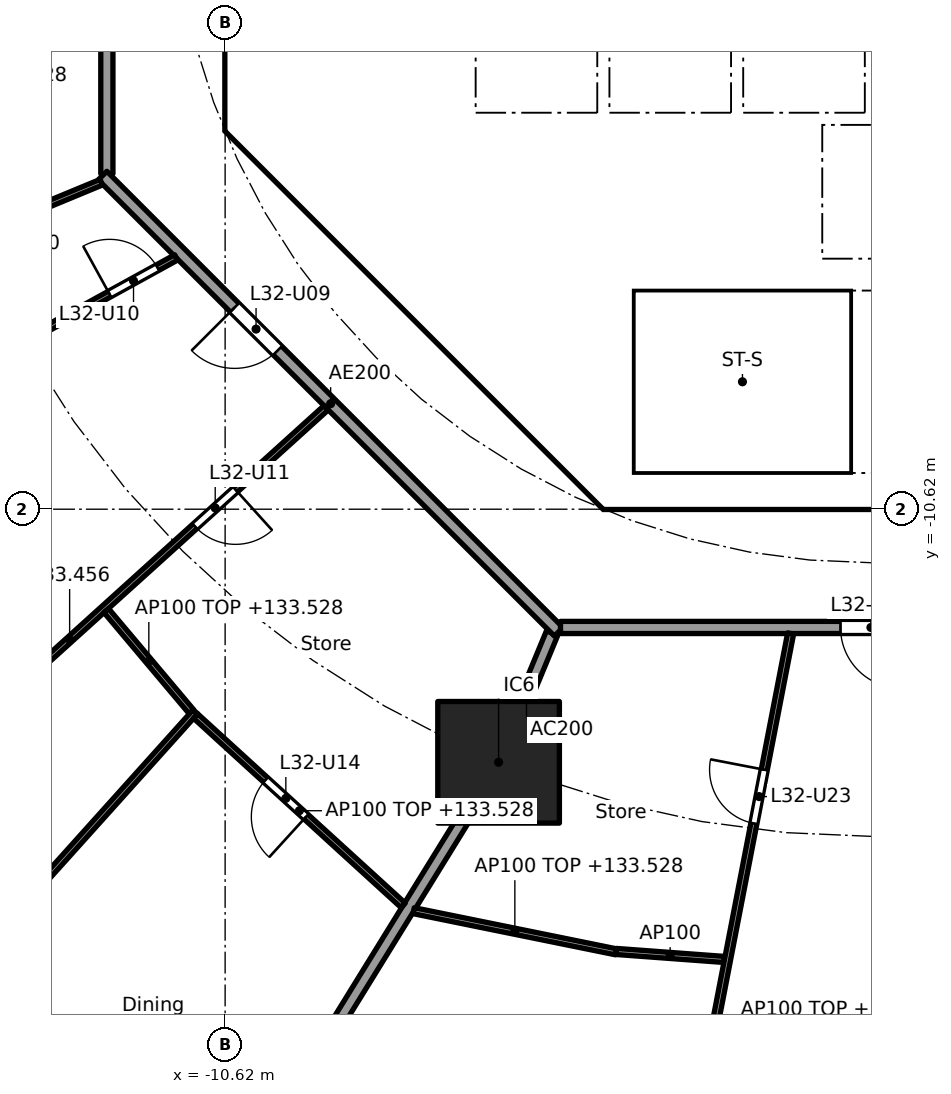
"""IFC4 building model, lengths in metres.
Left out: names, types, materials, properties, quantities, classifications, styles, units other than length and angle.
Written with IfcOpenShell. Run it as: python <this file> out.ifc"""

import sys

from ifc_helpers import new_model, si_unit, direction, frame, frame_2d, origin, origin_2d, place, context, subcontext, project, spatial, polyline, rectangle, outline, extrude, element, fill, save


model = new_model("IFC4")
c1 = context("Model", 3, precision=1e-05, world=origin(), true_north=direction((0.0, 1.0)))
c2 = subcontext(c1, "Body", "Model", "MODEL_VIEW")
j1 = project(units=[si_unit("LENGTHUNIT", "METRE"), si_unit("PLANEANGLEUNIT", "RADIAN")], contexts=[c1])
p1 = place(None, origin())
s1 = spatial("IfcSite", under=j1, at=p1, CompositionType="ELEMENT")
p2 = place(p1, origin())
s2 = spatial("IfcBuilding", under=s1, at=p2, CompositionType="ELEMENT")
p3 = place(p2, frame((0.0, 0.0, 130.7)))
s3 = spatial("IfcBuildingStorey", under=s2, at=p3, CompositionType="ELEMENT", Elevation=130.7)
p4 = place(p3, frame((-6.123, -14.782, 0.0), z_axis=(0.0, 0.0, 1.0), x_axis=(1.0, 0.0, 0.0)))
e1 = element("IfcColumn", 1, at=p4, inside=s3, PredefinedType="COLUMN", context=c2, shape_type="SweptSolid", body=[
    extrude(rectangle(XDim=2.0, YDim=2.0, at=origin_2d()), origin(), (0.0, 0.0, 1.0), 3.7),
])
p5 = place(p3, frame((-10.325, 3.801, 0.0), z_axis=(0.0, 0.0, 1.0), x_axis=(0.0, -1.0, 0.0)))
e2 = element("IfcWall", 2, at=p5, inside=s3, PredefinedType="SHEAR", context=c2, shape_type="SweptSolid", body=[
    extrude(rectangle(XDim=7.602, YDim=0.6, at=frame_2d((3.801, 0.0))), origin(), (0.0, 0.0, 1.0), 3.44),
])
p6 = place(p5, frame((0.651, 0.0, 0.0)))
e3 = element("IfcOpeningElement", 3, at=p6, cuts=e2, PredefinedType="OPENING", context=c2, shape_type="SweptSolid", body=[
    extrude(rectangle(XDim=1.5, YDim=2.1, at=frame_2d((0.75, 1.05))), frame((0.0, 0.31, 0.0), z_axis=(0.0, -1.0, 0.0), x_axis=(1.0, 0.0, 0.0)), (0.0, 0.0, 1.0), 0.62),
])
p7 = place(p5, frame((5.451, 0.0, 0.0)))
e4 = element("IfcOpeningElement", 4, at=p7, cuts=e2, PredefinedType="OPENING", context=c2, shape_type="SweptSolid", body=[
    extrude(rectangle(XDim=1.5, YDim=2.1, at=frame_2d((0.75, 1.05))), frame((0.0, 0.31, 0.0), z_axis=(0.0, -1.0, 0.0), x_axis=(1.0, 0.0, 0.0)), (0.0, 0.0, 1.0), 0.62),
])
p8 = place(p3, frame((-9.988, -4.613, 0.0), z_axis=(0.0, 0.0, 1.0), x_axis=(0.707106781187, -0.707106781187, 0.0)))
e5 = element("IfcWall", 5, at=p8, inside=s3, PredefinedType="SHEAR", context=c2, shape_type="SweptSolid", body=[
    extrude(rectangle(XDim=7.602, YDim=0.6, at=frame_2d((3.801, 0.0))), origin(), (0.0, 0.0, 1.0), 3.44),
])
p9 = place(p8, frame((6.151, 0.0, 0.0)))
e6 = element("IfcOpeningElement", 6, at=p9, cuts=e5, PredefinedType="OPENING", context=c2, shape_type="SweptSolid", body=[
    extrude(rectangle(XDim=1.1, YDim=2.1, at=frame_2d((0.55, 1.05))), frame((0.0, 0.31, 0.0), z_axis=(0.0, -1.0, 0.0), x_axis=(1.0, 0.0, 0.0)), (0.0, 0.0, 1.0), 0.62),
])
p10 = place(p3, frame((-6.2, -7.827, 0.0), z_axis=(0.0, 0.0, 1.0), x_axis=(0.0, 1.0, 0.0)))
e7 = element("IfcWall", 7, at=p10, inside=s3, PredefinedType="PARTITIONING", context=c2, shape_type="SweptSolid", body=[
    extrude(rectangle(XDim=3.527, YDim=0.15, at=frame_2d((1.763, 0.0))), origin(), (0.0, 0.0, 1.0), 3.44),
])
p11 = place(p10, frame((2.365, 0.0, 0.0)))
e8 = element("IfcOpeningElement", 8, at=p11, cuts=e7, PredefinedType="OPENING", context=c2, shape_type="SweptSolid", body=[
    extrude(rectangle(XDim=0.9, YDim=2.1, at=frame_2d((0.45, 1.05))), frame((0.0, 0.085, 0.0), z_axis=(0.0, -1.0, 0.0), x_axis=(1.0, 0.0, 0.0)), (0.0, 0.0, 1.0), 0.17),
])
p12 = place(p10, frame((0.489, 0.0, 0.0)))
e9 = element("IfcOpeningElement", 9, at=p12, cuts=e7, PredefinedType="OPENING", context=c2, shape_type="SweptSolid", body=[
    extrude(rectangle(XDim=0.9, YDim=2.1, at=frame_2d((0.45, 1.05))), frame((0.0, 0.085, 0.0), z_axis=(0.0, -1.0, 0.0), x_axis=(1.0, 0.0, 0.0)), (0.0, 0.0, 1.0), 0.17),
])
p13 = place(p3, frame((-4.0, -6.5, 0.0), z_axis=(0.0, 0.0, 1.0), x_axis=(0.0, 1.0, 0.0)))
e10 = element("IfcWall", 10, at=p13, inside=s3, PredefinedType="SOLIDWALL", context=c2, shape_type="SweptSolid", body=[
    extrude(rectangle(XDim=2.2, YDim=0.2, at=frame_2d((1.1, 0.0))), origin(), (0.0, 0.0, 1.0), 3.44),
])
p14 = place(p13, frame((0.65, 0.0, 0.0)))
e11 = element("IfcOpeningElement", 11, at=p14, cuts=e10, PredefinedType="OPENING", context=c2, shape_type="SweptSolid", body=[
    extrude(rectangle(XDim=0.9, YDim=2.1, at=frame_2d((0.45, 1.05))), frame((0.0, 0.11, 0.0), z_axis=(0.0, -1.0, 0.0), x_axis=(1.0, 0.0, 0.0)), (0.0, 0.0, 1.0), 0.22),
])
p15 = place(p3, origin())
e12 = element("IfcWall", 12, at=p15, inside=s3, PredefinedType="SHEAR", context=c2, shape_type="SweptSolid", body=[
    extrude(outline(polyline([(-10.625, -3.801), (-10.025, -3.801), (-10.025, -4.152), (-9.776, -4.401), (-10.2, -4.825), (-10.625, -4.401), (-10.625, -3.801)])), origin(), (0.0, 0.0, 1.0), 3.44),
])
p16 = place(p3, origin())
e13 = element("IfcWall", 13, at=p16, inside=s3, PredefinedType="SHEAR", context=c2, shape_type="SweptSolid", body=[
    extrude(outline(polyline([(-4.152, -10.025), (4.152, -10.025), (4.401, -9.776), (4.825, -10.2), (4.401, -10.625), (-4.401, -10.625), (-4.825, -10.2), (-4.401, -9.776), (-4.152, -10.025)])), origin(), (0.0, 0.0, 1.0), 3.44),
])
p17 = place(p3, frame((-10.025, -4.0, 0.0), z_axis=(0.0, 0.0, 1.0), x_axis=(1.0, 0.0, 0.0)))
e14 = element("IfcWall", 14, at=p17, inside=s3, PredefinedType="PARTITIONING", context=c2, shape_type="SweptSolid", body=[
    extrude(rectangle(XDim=3.325, YDim=0.2, at=frame_2d((1.662, 0.0))), origin(), (0.0, 0.0, 1.0), 3.44),
])
p18 = place(p3, frame((-8.301, -5.8, 0.0), z_axis=(0.0, 0.0, 1.0), x_axis=(1.0, 0.0, 0.0)))
e15 = element("IfcWall", 15, at=p18, inside=s3, PredefinedType="PARTITIONING", context=c2, shape_type="SweptSolid", body=[
    extrude(rectangle(XDim=2.026, YDim=0.15, at=frame_2d((1.013, 0.0))), origin(), (0.0, 0.0, 1.0), 3.44),
])
p19 = place(p3, frame((-0.9, -6.5, 0.0), z_axis=(0.0, 0.0, 1.0), x_axis=(0.0, 1.0, 0.0)))
e16 = element("IfcWall", 16, at=p19, inside=s3, PredefinedType="SOLIDWALL", context=c2, shape_type="SweptSolid", body=[
    extrude(rectangle(XDim=2.2, YDim=0.2, at=frame_2d((1.1, 0.0))), origin(), (0.0, 0.0, 1.0), 3.44),
])
p20 = place(p3, origin())
e17 = element("IfcWall", 17, at=p20, inside=s3, PredefinedType="SOLIDWALL", context=c2, shape_type="SweptSolid", body=[
    extrude(outline(polyline([(-6.7, -2.1), (-6.5, -2.1), (-6.5, -4.1), (-4.5, -4.1), (-4.5, -2.1), (-4.3, -2.1), (-4.3, -4.1), (-2.3, -4.1), (-2.3, -2.1), (-2.1, -2.1), (-2.1, -4.1), (-0.1, -4.1), (-0.1, -2.1), (0.1, -2.1), (0.1, -4.1), (2.1, -4.1), (2.1, -2.1), (2.3, -2.1), (2.3, -4.1), (4.3, -4.1), (4.3, -2.1), (4.5, -2.1), (4.5, -4.1), (6.5, -4.1), (6.5, -2.1), (6.7, -2.1), (6.7, -4.3), (-6.7, -4.3), (-6.7, -2.1)])), origin(), (0.0, 0.0, 1.0), 3.44),
])
p21 = place(p3, origin())
e18 = element("IfcWall", 18, at=p21, inside=s3, PredefinedType="SOLIDWALL", context=c2, shape_type="SweptSolid", body=[
    extrude(outline(polyline([(-3.9, -10.025), (-4.1, -10.025), (-4.1, -7.025), (-3.9, -7.025), (-3.9, -10.025)])), origin(), (0.0, 0.0, 1.0), 3.44),
])
p22 = place(p3, origin())
e19 = element("IfcWall", 19, at=p22, inside=s3, PredefinedType="SOLIDWALL", context=c2, shape_type="SweptSolid", body=[
    extrude(outline(polyline([(4.1, -7.025), (-4.1, -7.025), (-4.1, -6.5), (4.1, -6.5), (4.1, -7.025)])), origin(), (0.0, 0.0, 1.0), 3.44),
])
p23 = place(p3, frame((-5.243, -12.657, 0.0), z_axis=(0.0, 0.0, 1.0), x_axis=(-0.382818775282, -0.923823460025, 0.0)))
e20 = element("IfcWall", 20, at=p23, inside=s3, PredefinedType="PARTITIONING", context=c2, shape_type="SweptSolid", body=[
    extrude(rectangle(XDim=2.201, YDim=0.2, at=frame_2d((1.101, 0.0))), origin(), (0.0, 0.0, 1.0), 3.44),
])
p24 = place(p3, frame((-6.149, -14.825, 0.0), z_axis=(0.0, 0.0, 1.0), x_axis=(-0.525406383516, -0.85085141603, 0.0)))
e21 = element("IfcWall", 21, at=p24, inside=s3, PredefinedType="PARTITIONING", context=c2, shape_type="SweptSolid", body=[
    extrude(rectangle(XDim=15.925, YDim=0.2, at=frame_2d((7.962, 0.0))), origin(), (0.0, 0.0, 1.0), 2.828),
])
p25 = place(p3, frame((-12.565, 5.304, 0.0), z_axis=(0.0, 0.0, 1.0), x_axis=(0.0, -1.0, 0.0)))
e22 = element("IfcWall", 22, at=p25, inside=s3, PredefinedType="PARTITIONING", context=c2, shape_type="SweptSolid", body=[
    extrude(rectangle(XDim=10.409, YDim=0.2, at=frame_2d((5.205, 0.0))), origin(), (0.0, 0.0, 1.0), 3.44),
])
p26 = place(p3, frame((-12.635, -5.134, 0.0), z_axis=(0.0, 0.0, 1.0), x_axis=(0.707106781187, -0.707106781187, 0.0)))
e23 = element("IfcWall", 23, at=p26, inside=s3, PredefinedType="PARTITIONING", context=c2, shape_type="SweptSolid", body=[
    extrude(rectangle(XDim=10.609, YDim=0.2, at=frame_2d((5.305, 0.0))), origin(), (0.0, 0.0, 1.0), 3.44),
])
p27 = place(p26, frame((3.07, 0.0, 0.0)))
e24 = element("IfcOpeningElement", 24, at=p27, cuts=e23, PredefinedType="OPENING", context=c2, shape_type="SweptSolid", body=[
    extrude(rectangle(XDim=1.0, YDim=2.1, at=frame_2d((0.5, 1.05))), frame((0.0, 0.11, 0.0), z_axis=(0.0, -1.0, 0.0), x_axis=(1.0, 0.0, 0.0)), (0.0, 0.0, 1.0), 0.22),
])
p28 = place(p3, frame((-5.104, -12.565, 0.0), z_axis=(0.0, 0.0, 1.0), x_axis=(1.0, 0.0, 0.0)))
e25 = element("IfcWall", 25, at=p28, inside=s3, PredefinedType="PARTITIONING", context=c2, shape_type="SweptSolid", body=[
    extrude(rectangle(XDim=10.409, YDim=0.2, at=frame_2d((5.205, 0.0))), origin(), (0.0, 0.0, 1.0), 3.44),
])
p29 = place(p28, frame((4.604, 0.0, 0.0)))
e26 = element("IfcOpeningElement", 26, at=p29, cuts=e25, PredefinedType="OPENING", context=c2, shape_type="SweptSolid", body=[
    extrude(rectangle(XDim=1.0, YDim=2.1, at=frame_2d((0.5, 1.05))), frame((0.0, 0.11, 0.0), z_axis=(0.0, -1.0, 0.0), x_axis=(1.0, 0.0, 0.0)), (0.0, 0.0, 1.0), 0.22),
])
p30 = place(p3, frame((-12.657, -5.243, 0.0), z_axis=(0.0, 0.0, 1.0), x_axis=(-0.923864733477, -0.382719158442, 0.0)))
e27 = element("IfcWall", 27, at=p30, inside=s3, PredefinedType="PARTITIONING", context=c2, shape_type="SweptSolid", body=[
    extrude(rectangle(XDim=2.25, YDim=0.1, at=frame_2d((1.125, 0.0))), origin(), (0.0, 0.0, 1.0), 3.44),
])
p31 = place(p3, frame((-11.426, -6.479, 0.0), z_axis=(0.0, 0.0, 1.0), x_axis=(-0.876110392495, -0.482110547657, 0.0)))
e28 = element("IfcWall", 28, at=p31, inside=s3, PredefinedType="PARTITIONING", context=c2, shape_type="SweptSolid", body=[
    extrude(rectangle(XDim=16.955, YDim=0.1, at=frame_2d((8.478, 0.0))), origin(), (0.0, 0.0, 1.0), 2.756),
])
p32 = place(p31, frame((0.35, 0.0, 0.0)))
e29 = element("IfcOpeningElement", 29, at=p32, cuts=e28, PredefinedType="OPENING", context=c2, shape_type="SweptSolid", body=[
    extrude(rectangle(XDim=0.9, YDim=2.1, at=frame_2d((0.45, 1.05))), frame((0.0, 0.06, 0.0), z_axis=(0.0, -1.0, 0.0), x_axis=(1.0, 0.0, 0.0)), (0.0, 0.0, 1.0), 0.12),
])
p33 = place(p31, frame((6.957, 0.0, 0.0)))
e30 = element("IfcOpeningElement", 30, at=p33, cuts=e28, PredefinedType="OPENING", context=c2, shape_type="SweptSolid", body=[
    extrude(rectangle(XDim=0.9, YDim=2.1, at=frame_2d((0.45, 1.05))), frame((0.0, 0.06, 0.0), z_axis=(0.0, -1.0, 0.0), x_axis=(1.0, 0.0, 0.0)), (0.0, 0.0, 1.0), 0.12),
])
p34 = place(p31, frame((13.206, 0.0, 0.0)))
e31 = element("IfcOpeningElement", 31, at=p34, cuts=e28, PredefinedType="OPENING", context=c2, shape_type="SweptSolid", body=[
    extrude(rectangle(XDim=0.9, YDim=2.1, at=frame_2d((0.45, 1.05))), frame((0.0, 0.06, 0.0), z_axis=(0.0, -1.0, 0.0), x_axis=(1.0, 0.0, 0.0)), (0.0, 0.0, 1.0), 0.12),
])
p35 = place(p3, frame((-8.959, -8.952, 0.0), z_axis=(0.0, 0.0, 1.0), x_axis=(-0.741982736283, -0.670418987692, 0.0)))
e32 = element("IfcWall", 32, at=p35, inside=s3, PredefinedType="PARTITIONING", context=c2, shape_type="SweptSolid", body=[
    extrude(rectangle(XDim=11.371, YDim=0.1, at=frame_2d((5.685, 0.0))), origin(), (0.0, 0.0, 1.0), 2.756),
])
p36 = place(p35, frame((2.009, 0.0, 0.0)))
e33 = element("IfcOpeningElement", 33, at=p36, cuts=e32, PredefinedType="OPENING", context=c2, shape_type="SweptSolid", body=[
    extrude(rectangle(XDim=0.9, YDim=2.1, at=frame_2d((0.45, 1.05))), frame((0.0, 0.06, 0.0), z_axis=(0.0, -1.0, 0.0), x_axis=(1.0, 0.0, 0.0)), (0.0, 0.0, 1.0), 0.12),
])
p37 = place(p35, frame((7.694, 0.0, 0.0)))
e34 = element("IfcOpeningElement", 34, at=p37, cuts=e32, PredefinedType="OPENING", context=c2, shape_type="SweptSolid", body=[
    extrude(rectangle(XDim=0.9, YDim=2.1, at=frame_2d((0.45, 1.05))), frame((0.0, 0.06, 0.0), z_axis=(0.0, -1.0, 0.0), x_axis=(1.0, 0.0, 0.0)), (0.0, 0.0, 1.0), 0.12),
])
p38 = place(p3, frame((-12.575, -12.286, 0.0), z_axis=(0.0, 0.0, 1.0), x_axis=(0.644052758448, -0.764981074495, 0.0)))
e35 = element("IfcWall", 35, at=p38, inside=s3, PredefinedType="PARTITIONING", context=c2, shape_type="SweptSolid", body=[
    extrude(rectangle(XDim=2.174, YDim=0.1, at=frame_2d((1.087, 0.0))), origin(), (0.0, 0.0, 1.0), 2.828),
])
p39 = place(p3, frame((-11.109, -13.951, 0.0), z_axis=(0.0, 0.0, 1.0), x_axis=(-0.668488676691, -0.743722319913, 0.0)))
e36 = element("IfcWall", 36, at=p39, inside=s3, PredefinedType="PARTITIONING", context=c2, shape_type="SweptSolid", body=[
    extrude(rectangle(XDim=13.094, YDim=0.1, at=frame_2d((6.547, 0.0))), origin(), (0.0, 0.0, 1.0), 2.828),
])
p40 = place(p39, frame((9.5, 0.0, 0.0)))
e37 = element("IfcOpeningElement", 37, at=p40, cuts=e36, PredefinedType="OPENING", context=c2, shape_type="SweptSolid", body=[
    extrude(rectangle(XDim=0.9, YDim=2.1, at=frame_2d((0.45, 1.05))), frame((0.0, 0.06, 0.0), z_axis=(0.0, -1.0, 0.0), x_axis=(1.0, 0.0, 0.0)), (0.0, 0.0, 1.0), 0.12),
])
p41 = place(p3, frame((-11.105, -14.021, 0.0), z_axis=(0.0, 0.0, 1.0), x_axis=(0.738880014758, -0.673837015747, 0.0)))
e38 = element("IfcWall", 38, at=p41, inside=s3, PredefinedType="PARTITIONING", context=c2, shape_type="SweptSolid", body=[
    extrude(rectangle(XDim=4.621, YDim=0.1, at=frame_2d((2.31, 0.0))), origin(), (0.0, 0.0, 1.0), 2.828),
])
p42 = place(p41, frame((1.558, 0.0, 0.0)))
e39 = element("IfcOpeningElement", 39, at=p42, cuts=e38, PredefinedType="OPENING", context=c2, shape_type="SweptSolid", body=[
    extrude(rectangle(XDim=0.9, YDim=2.1, at=frame_2d((0.45, 1.05))), frame((0.0, 0.06, 0.0), z_axis=(0.0, -1.0, 0.0), x_axis=(1.0, 0.0, 0.0)), (0.0, 0.0, 1.0), 0.12),
])
p43 = place(p3, frame((-7.52, -17.222, 0.0), z_axis=(0.0, 0.0, 1.0), x_axis=(0.979964966792, -0.199169937141, 0.0)))
e40 = element("IfcWall", 40, at=p43, inside=s3, PredefinedType="PARTITIONING", context=c2, shape_type="SweptSolid", body=[
    extrude(rectangle(XDim=3.397, YDim=0.1, at=frame_2d((1.698, 0.0))), origin(), (0.0, 0.0, 1.0), 2.828),
])
p44 = place(p3, frame((-4.19, -17.893, 0.0), z_axis=(0.0, 0.0, 1.0), x_axis=(0.99727037024, -0.07383636395, 0.0)))
e41 = element("IfcWall", 41, at=p44, inside=s3, PredefinedType="PARTITIONING", context=c2, shape_type="SweptSolid", body=[
    extrude(rectangle(XDim=1.782, YDim=0.1, at=frame_2d((0.891, 0.0))), origin(), (0.0, 0.0, 1.0), 3.44),
])
p45 = place(p3, frame((-1.32, -12.663, 0.0), z_axis=(0.0, 0.0, 1.0), x_axis=(-0.189865535907, -0.98181010296, 0.0)))
e42 = element("IfcWall", 42, at=p45, inside=s3, PredefinedType="PARTITIONING", context=c2, shape_type="SweptSolid", body=[
    extrude(rectangle(XDim=20.729, YDim=0.1, at=frame_2d((10.365, 0.0))), origin(), (0.0, 0.0, 1.0), 2.756),
])
p46 = place(p45, frame((2.283, 0.0, 0.0)))
e43 = element("IfcOpeningElement", 43, at=p46, cuts=e42, PredefinedType="OPENING", context=c2, shape_type="SweptSolid", body=[
    extrude(rectangle(XDim=0.9, YDim=2.1, at=frame_2d((0.45, 1.05))), frame((0.0, 0.06, 0.0), z_axis=(0.0, -1.0, 0.0), x_axis=(1.0, 0.0, 0.0)), (0.0, 0.0, 1.0), 0.12),
])
p47 = place(p45, frame((8.622, 0.0, 0.0)))
e44 = element("IfcOpeningElement", 44, at=p47, cuts=e42, PredefinedType="OPENING", context=c2, shape_type="SweptSolid", body=[
    extrude(rectangle(XDim=0.9, YDim=2.1, at=frame_2d((0.45, 1.05))), frame((0.0, 0.06, 0.0), z_axis=(0.0, -1.0, 0.0), x_axis=(1.0, 0.0, 0.0)), (0.0, 0.0, 1.0), 0.12),
])
p48 = place(p11, origin())
e45 = element("IfcDoor", 45, at=p48, inside=s3, OperationType="SINGLE_SWING_RIGHT", PredefinedType="DOOR", context=c2, shape_type="SweptSolid", body=[
    extrude(rectangle(XDim=0.9, YDim=2.1, at=frame_2d((0.45, 1.05))), frame((0.0, 0.025, 0.0), z_axis=(0.0, -1.0, 0.0), x_axis=(1.0, 0.0, 0.0)), (0.0, 0.0, 1.0), 0.05),
])
fill(e8, e45)
p49 = place(p12, origin())
e46 = element("IfcDoor", 46, at=p49, inside=s3, OperationType="SINGLE_SWING_RIGHT", PredefinedType="DOOR", context=c2, shape_type="SweptSolid", body=[
    extrude(rectangle(XDim=0.9, YDim=2.1, at=frame_2d((0.45, 1.05))), frame((0.0, 0.025, 0.0), z_axis=(0.0, -1.0, 0.0), x_axis=(1.0, 0.0, 0.0)), (0.0, 0.0, 1.0), 0.05),
])
fill(e9, e46)
p50 = place(p14, frame((0.9, 0.0, 0.0), x_axis=(-1.0, 0.0, 0.0)))
e47 = element("IfcDoor", 47, at=p50, inside=s3, OperationType="SINGLE_SWING_LEFT", PredefinedType="DOOR", context=c2, shape_type="SweptSolid", body=[
    extrude(rectangle(XDim=0.9, YDim=2.1, at=frame_2d((0.45, 1.05))), frame((0.0, 0.025, 0.0), z_axis=(0.0, -1.0, 0.0), x_axis=(1.0, 0.0, 0.0)), (0.0, 0.0, 1.0), 0.05),
])
fill(e11, e47)
p51 = place(p7, origin())
e48 = element("IfcDoor", 48, at=p51, inside=s3, OperationType="DOUBLE_DOOR_SINGLE_SWING", PredefinedType="DOOR", context=c2, shape_type="SweptSolid", body=[
    extrude(rectangle(XDim=1.5, YDim=2.1, at=frame_2d((0.75, 1.05))), frame((0.0, 0.025, 0.0), z_axis=(0.0, -1.0, 0.0), x_axis=(1.0, 0.0, 0.0)), (0.0, 0.0, 1.0), 0.05),
])
fill(e4, e48)
p52 = place(p9, origin())
e49 = element("IfcDoor", 49, at=p52, inside=s3, OperationType="SINGLE_SWING_LEFT", PredefinedType="DOOR", context=c2, shape_type="SweptSolid", body=[
    extrude(rectangle(XDim=1.1, YDim=2.1, at=frame_2d((0.55, 1.05))), frame((0.0, 0.025, 0.0), z_axis=(0.0, -1.0, 0.0), x_axis=(1.0, 0.0, 0.0)), (0.0, 0.0, 1.0), 0.05),
])
fill(e6, e49)
p53 = place(p27, frame((1.0, 0.0, 0.0), x_axis=(-1.0, 0.0, 0.0)))
e50 = element("IfcDoor", 50, at=p53, inside=s3, OperationType="SINGLE_SWING_RIGHT", PredefinedType="DOOR", context=c2, shape_type="SweptSolid", body=[
    extrude(rectangle(XDim=1.0, YDim=2.1, at=frame_2d((0.5, 1.05))), frame((0.0, 0.025, 0.0), z_axis=(0.0, -1.0, 0.0), x_axis=(1.0, 0.0, 0.0)), (0.0, 0.0, 1.0), 0.05),
])
fill(e24, e50)
p54 = place(p32, frame((0.9, 0.0, 0.0), x_axis=(-1.0, 0.0, 0.0)))
e51 = element("IfcDoor", 51, at=p54, inside=s3, OperationType="SINGLE_SWING_LEFT", PredefinedType="DOOR", context=c2, shape_type="SweptSolid", body=[
    extrude(rectangle(XDim=0.9, YDim=2.1, at=frame_2d((0.45, 1.05))), frame((0.0, 0.025, 0.0), z_axis=(0.0, -1.0, 0.0), x_axis=(1.0, 0.0, 0.0)), (0.0, 0.0, 1.0), 0.05),
])
fill(e29, e51)
p55 = place(p36, origin())
e52 = element("IfcDoor", 52, at=p55, inside=s3, OperationType="SINGLE_SWING_LEFT", PredefinedType="DOOR", context=c2, shape_type="SweptSolid", body=[
    extrude(rectangle(XDim=0.9, YDim=2.1, at=frame_2d((0.45, 1.05))), frame((0.0, 0.025, 0.0), z_axis=(0.0, -1.0, 0.0), x_axis=(1.0, 0.0, 0.0)), (0.0, 0.0, 1.0), 0.05),
])
fill(e33, e52)
p56 = place(p42, frame((0.9, 0.0, 0.0), x_axis=(-1.0, 0.0, 0.0)))
e53 = element("IfcDoor", 53, at=p56, inside=s3, OperationType="SINGLE_SWING_LEFT", PredefinedType="DOOR", context=c2, shape_type="SweptSolid", body=[
    extrude(rectangle(XDim=0.9, YDim=2.1, at=frame_2d((0.45, 1.05))), frame((0.0, 0.025, 0.0), z_axis=(0.0, -1.0, 0.0), x_axis=(1.0, 0.0, 0.0)), (0.0, 0.0, 1.0), 0.05),
])
fill(e39, e53)
p57 = place(p29, frame((1.0, 0.0, 0.0), x_axis=(-1.0, 0.0, 0.0)))
e54 = element("IfcDoor", 54, at=p57, inside=s3, OperationType="SINGLE_SWING_LEFT", PredefinedType="DOOR", context=c2, shape_type="SweptSolid", body=[
    extrude(rectangle(XDim=1.0, YDim=2.1, at=frame_2d((0.5, 1.05))), frame((0.0, 0.025, 0.0), z_axis=(0.0, -1.0, 0.0), x_axis=(1.0, 0.0, 0.0)), (0.0, 0.0, 1.0), 0.05),
])
fill(e26, e54)
p58 = place(p46, frame((0.9, 0.0, 0.0), x_axis=(-1.0, 0.0, 0.0)))
e55 = element("IfcDoor", 55, at=p58, inside=s3, OperationType="SINGLE_SWING_RIGHT", PredefinedType="DOOR", context=c2, shape_type="SweptSolid", body=[
    extrude(rectangle(XDim=0.9, YDim=2.1, at=frame_2d((0.45, 1.05))), frame((0.0, 0.025, 0.0), z_axis=(0.0, -1.0, 0.0), x_axis=(1.0, 0.0, 0.0)), (0.0, 0.0, 1.0), 0.05),
])
fill(e43, e55)
save(model, sys.argv[1])
